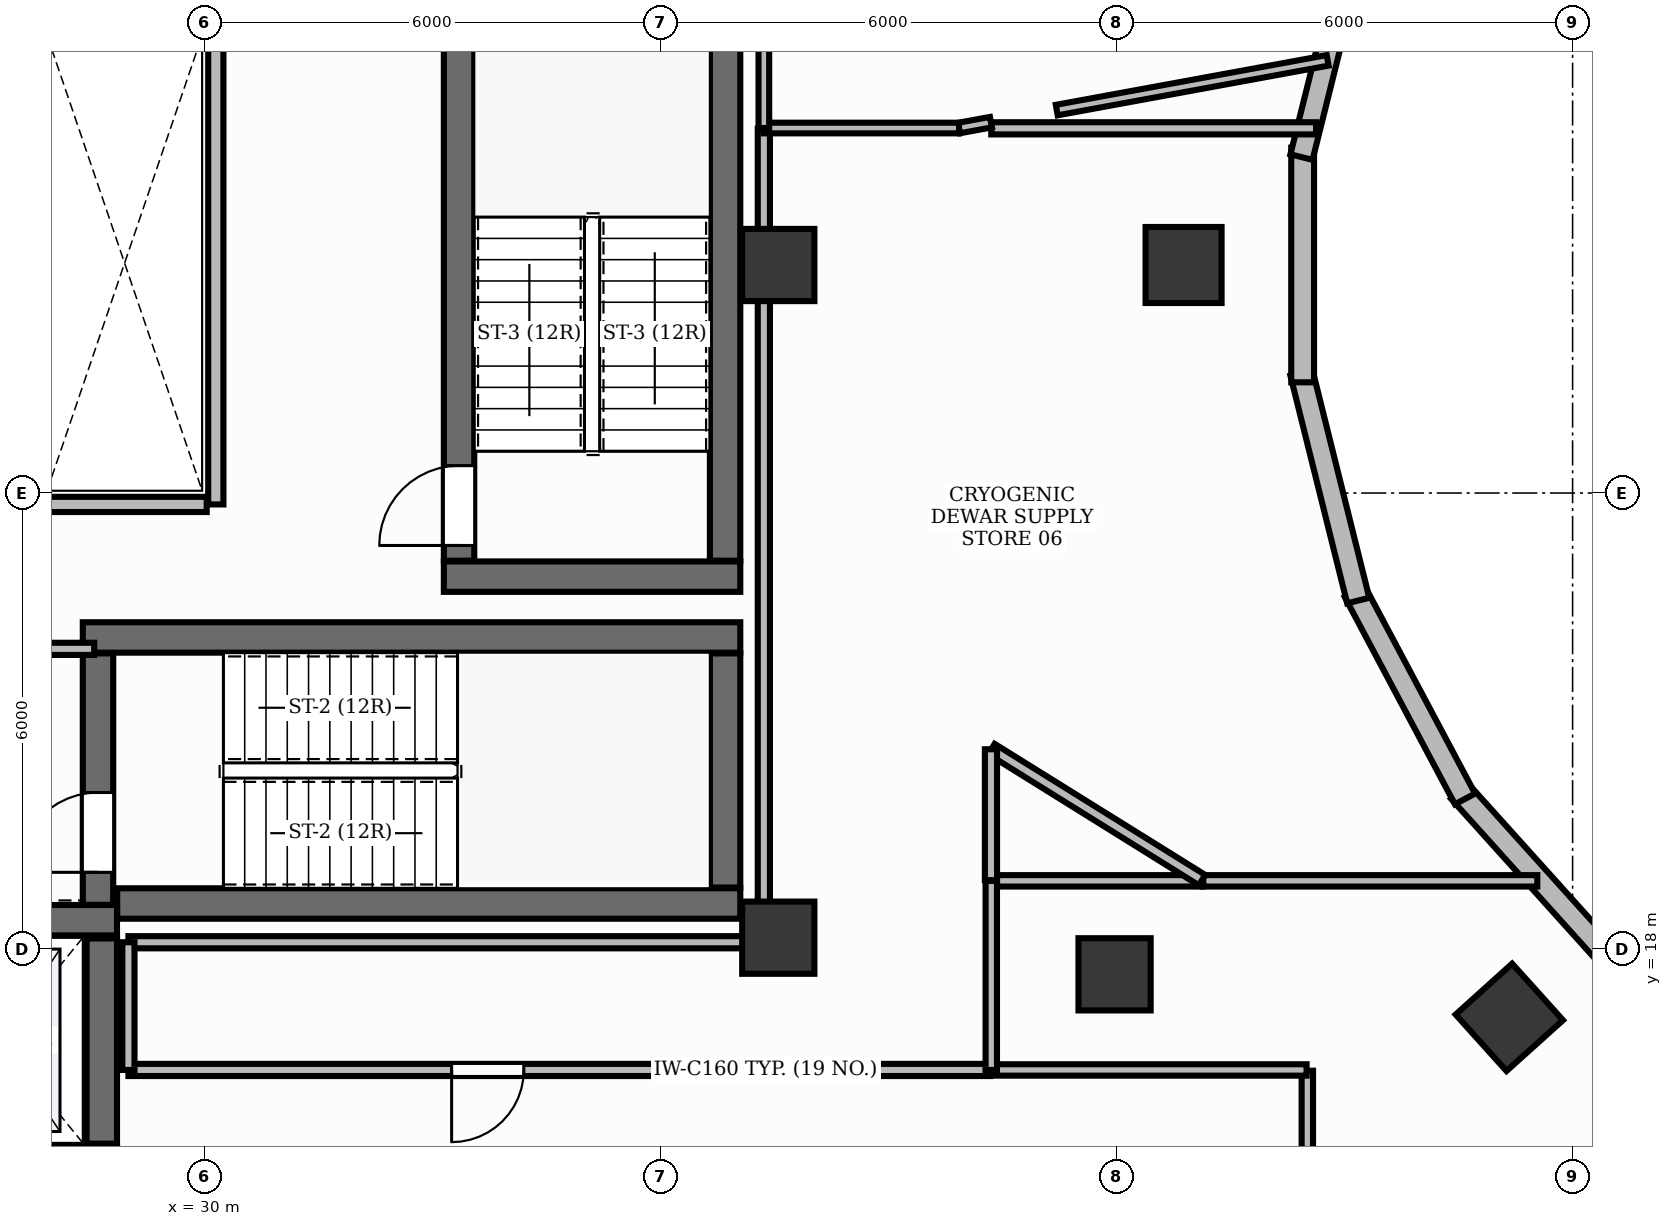
"""IFC4 building model, lengths in metres.
Left out: names, types, materials, properties, quantities, classifications, styles, units other than length and angle.
Written with IfcOpenShell. Run it as: python <this file> out.ifc"""

import sys

from ifc_helpers import new_model, si_unit, direction, frame, frame_2d, origin, origin_2d, place, context, subcontext, project, spatial, rectangle, extrude, element, fill, save


model = new_model("IFC4")
c1 = context("Model", 3, precision=1e-05, world=origin(), true_north=direction((0.0, 1.0)))
c2 = subcontext(c1, "Body", "Model", "MODEL_VIEW")
j1 = project(units=[si_unit("LENGTHUNIT", "METRE"), si_unit("PLANEANGLEUNIT", "RADIAN")], contexts=[c1])
p1 = place(None, origin())
s1 = spatial("IfcSite", under=j1, at=p1, CompositionType="ELEMENT")
p2 = place(p1, origin())
s2 = spatial("IfcBuilding", under=s1, at=p2, CompositionType="ELEMENT")
p3 = place(p2, frame((0.0, 0.0, 192.0)))
s3 = spatial("IfcBuildingStorey", under=s2, at=p3, CompositionType="ELEMENT", Elevation=192.0)
p4 = place(p3, frame((28.852, 18.6, 0.0), z_axis=(0.0, 0.0, 1.0), x_axis=(1.0, 0.0, 0.0)))
e1 = element("IfcWall", 1, at=p4, inside=s3, PredefinedType="SHEAR", context=c2, shape_type="SweptSolid", body=[
    extrude(rectangle(XDim=8.198, YDim=0.4, at=frame_2d((4.099, 0.0))), origin(), (0.0, 0.0, 1.0), 3.9),
])
p5 = place(p3, frame((28.4, 22.1, 0.0), z_axis=(0.0, 0.0, 1.0), x_axis=(1.0, 0.0, 0.0)))
e2 = element("IfcWall", 2, at=p5, inside=s3, PredefinedType="SHEAR", context=c2, shape_type="SweptSolid", body=[
    extrude(rectangle(XDim=8.65, YDim=0.4, at=frame_2d((4.325, 0.0))), origin(), (0.0, 0.0, 1.0), 3.9),
])
p6 = place(p3, frame((36.85, 18.81, 0.0), z_axis=(0.0, 0.0, 1.0), x_axis=(0.0, 1.0, 0.0)))
e3 = element("IfcWall", 3, at=p6, inside=s3, PredefinedType="SHEAR", context=c2, shape_type="SweptSolid", body=[
    extrude(rectangle(XDim=3.08, YDim=0.4, at=frame_2d((1.54, 0.0))), origin(), (0.0, 0.0, 1.0), 3.9),
])
p7 = place(p3, frame((28.6, 18.582, 0.0), z_axis=(0.0, 0.0, 1.0), x_axis=(0.0, 1.0, 0.0)))
e4 = element("IfcWall", 4, at=p7, inside=s3, PredefinedType="SHEAR", context=c2, shape_type="SweptSolid", body=[
    extrude(rectangle(XDim=3.308, YDim=0.4, at=frame_2d((1.654, 0.0))), origin(), (0.0, 0.0, 1.0), 3.9),
])
p8 = place(p7, frame((0.428, 0.0, 0.0)))
e5 = element("IfcOpeningElement", 5, at=p8, cuts=e4, PredefinedType="OPENING", context=c2, shape_type="SweptSolid", body=[
    extrude(rectangle(XDim=1.05, YDim=2.15, at=frame_2d((0.525, 1.075))), frame((0.0, 0.215, 0.0), z_axis=(0.0, -1.0, 0.0), x_axis=(1.0, 0.0, 0.0)), (0.0, 0.0, 1.0), 0.43),
])
p9 = place(p3, frame((33.15, 22.9, 0.0), z_axis=(0.0, 0.0, 1.0), x_axis=(1.0, 0.0, 0.0)))
e6 = element("IfcWall", 6, at=p9, inside=s3, PredefinedType="SHEAR", context=c2, shape_type="SweptSolid", body=[
    extrude(rectangle(XDim=3.9, YDim=0.4, at=frame_2d((1.95, 0.0))), origin(), (0.0, 0.0, 1.0), 3.9),
])
p10 = place(p3, frame((36.85, 23.11, 0.0), z_axis=(0.0, 0.0, 1.0), x_axis=(0.0, 1.0, 0.0)))
e7 = element("IfcWall", 7, at=p10, inside=s3, PredefinedType="SHEAR", context=c2, shape_type="SweptSolid", body=[
    extrude(rectangle(XDim=7.78, YDim=0.4, at=frame_2d((3.89, 0.0))), origin(), (0.0, 0.0, 1.0), 3.9),
])
p11 = place(p3, frame((33.35, 23.11, 0.0), z_axis=(0.0, 0.0, 1.0), x_axis=(0.0, 1.0, 0.0)))
e8 = element("IfcWall", 8, at=p11, inside=s3, PredefinedType="SHEAR", context=c2, shape_type="SweptSolid", body=[
    extrude(rectangle(XDim=7.78, YDim=0.4, at=frame_2d((3.89, 0.0))), origin(), (0.0, 0.0, 1.0), 3.9),
])
p12 = place(p11, frame((0.2, 0.0, 0.0)))
e9 = element("IfcOpeningElement", 9, at=p12, cuts=e8, PredefinedType="OPENING", context=c2, shape_type="SweptSolid", body=[
    extrude(rectangle(XDim=1.05, YDim=2.15, at=frame_2d((0.525, 1.075))), frame((0.0, 0.215, 0.0), z_axis=(0.0, -1.0, 0.0), x_axis=(1.0, 0.0, 0.0)), (0.0, 0.0, 1.0), 0.43),
])
p13 = place(p3, frame((25.75, 18.38, 0.0), z_axis=(0.0, 0.0, 1.0), x_axis=(1.0, 0.0, 0.0)))
e10 = element("IfcWall", 10, at=p13, inside=s3, PredefinedType="SHEAR", context=c2, shape_type="SweptSolid", body=[
    extrude(rectangle(XDim=3.1, YDim=0.4, at=frame_2d((1.55, 0.0))), origin(), (0.0, 0.0, 1.0), 3.9),
])
p14 = place(p13, frame((0.9, 0.0, 0.0)))
e11 = element("IfcOpeningElement", 11, at=p14, cuts=e10, PredefinedType="OPENING", context=c2, shape_type="SweptSolid", body=[
    extrude(rectangle(XDim=1.3, YDim=2.2, at=frame_2d((0.65, 1.1))), frame((0.0, 0.215, 0.0), z_axis=(0.0, -1.0, 0.0), x_axis=(1.0, 0.0, 0.0)), (0.0, 0.0, 1.0), 0.43),
])
p15 = place(p3, frame((28.65, 15.44, 0.0), z_axis=(0.0, 0.0, 1.0), x_axis=(0.0, 1.0, 0.0)))
e12 = element("IfcWall", 12, at=p15, inside=s3, PredefinedType="SHEAR", context=c2, shape_type="SweptSolid", body=[
    extrude(rectangle(XDim=2.7, YDim=0.4, at=frame_2d((1.35, 0.0))), origin(), (0.0, 0.0, 1.0), 3.9),
])
for number, where, z_axis, x_axis in (
    (13, (37.55, 18.15, -0.0), (0.0, 0.0, 1.0), (1.0, 0.0, 0.0)),
    (14, (37.55, 27.0, -0.0), (0.0, 0.0, 1.0), (1.0, 0.0, 0.0)),
):
    element("IfcColumn", number, at=place(p3, frame(where, z_axis=z_axis, x_axis=x_axis)), inside=s3, PredefinedType="PILASTER", context=c2, shape_type="SweptSolid", body=[
        extrude(rectangle(XDim=0.95, YDim=0.95, at=origin_2d()), origin(), (0.0, 0.0, 1.0), 3.901),
    ])
p16 = place(p3, frame((47.167, 17.102, -0.0), z_axis=(0.0, 0.0, 1.0), x_axis=(-0.669130606359, 0.743144825477, 0.0)))
e15 = element("IfcColumn", 15, at=p16, inside=s3, PredefinedType="COLUMN", context=c2, shape_type="SweptSolid", body=[
    extrude(rectangle(XDim=1.0, YDim=1.0, at=origin_2d()), origin(), (0.0, 0.0, 1.0), 3.901),
])
p17 = place(p3, frame((41.974, 17.668, -0.0), z_axis=(0.0, 0.0, 1.0), x_axis=(1.0, 0.0, 0.0)))
e16 = element("IfcColumn", 16, at=p17, inside=s3, PredefinedType="COLUMN", context=c2, shape_type="SweptSolid", body=[
    extrude(rectangle(XDim=0.95, YDim=0.95, at=origin_2d()), origin(), (0.0, 0.0, 1.0), 3.901),
])
p18 = place(p3, frame((42.882, 27.0, -0.0), z_axis=(0.0, 0.0, 1.0), x_axis=(0.0, 1.0, 0.0)))
e17 = element("IfcColumn", 17, at=p18, inside=s3, PredefinedType="COLUMN", context=c2, shape_type="SweptSolid", body=[
    extrude(rectangle(XDim=1.0, YDim=1.0, at=origin_2d()), origin(), (0.0, 0.0, 1.0), 3.901),
])
for number, where, z_axis, x_axis in (
    (18, (48.579, 17.784, 0.0), (0.0, 0.0, 1.0), (-0.669, 0.743, 0.0)),
    (19, (46.584, 19.976, 0.0), (0.0, 0.0, 1.0), (-0.469, 0.883, 0.0)),
    (20, (45.18, 22.585, 0.0), (0.0, 0.0, 1.0), (-0.242, 0.97, 0.0)),
    (21, (44.448, 25.457, 0.0), (0.0, 0.0, 1.0), (0.0, 1.0, 0.0)),
    (22, (44.433, 28.42, 0.0), (0.0, 0.0, 1.0), (0.242, 0.97, 0.0)),
):
    element("IfcWall", number, at=place(p3, frame(where, z_axis=z_axis, x_axis=x_axis)), inside=s3, PredefinedType="STANDARD", context=c2, shape_type="SweptSolid", body=[
        extrude(rectangle(XDim=3.087, YDim=0.3, at=frame_2d((1.543, 0.0))), origin(), (0.0, 0.0, 1.0), 3.9),
    ])
p19 = place(p3, frame((30.15, 23.85, 0.0), z_axis=(0.0, 0.0, 1.0), x_axis=(0.0, 1.0, 0.0)))
e23 = element("IfcWall", 23, at=p19, inside=s3, PredefinedType="PARTITIONING", context=c2, shape_type="SweptSolid", body=[
    extrude(rectangle(XDim=6.35, YDim=0.2, at=frame_2d((3.175, 0.0))), origin(), (0.0, 0.0, 1.0), 2.91),
])
p20 = place(p3, frame((27.934, 23.85, 0.0), z_axis=(0.0, 0.0, 1.0), x_axis=(1.0, 0.0, 0.0)))
e24 = element("IfcWall", 24, at=p20, inside=s3, PredefinedType="PARTITIONING", context=c2, shape_type="SweptSolid", body=[
    extrude(rectangle(XDim=2.096, YDim=0.2, at=frame_2d((1.048, 0.0))), origin(), (0.0, 0.0, 1.0), 2.91),
])
p21 = place(p3, frame((23.58, 21.95, 0.0), z_axis=(0.0, 0.0, 1.0), x_axis=(1.0, 0.0, 0.0)))
e25 = element("IfcWall", 25, at=p21, inside=s3, PredefinedType="PARTITIONING", context=c2, shape_type="SweptSolid", body=[
    extrude(rectangle(XDim=4.97, YDim=0.16, at=frame_2d((2.485, 0.0))), origin(), (0.0, 0.0, 1.0), 2.91),
])
p22 = place(p3, frame((40.342, 16.41, 0.0), z_axis=(0.0, 0.0, 1.0), x_axis=(-1.0, 0.0, 0.0)))
e26 = element("IfcWall", 26, at=p22, inside=s3, PredefinedType="PARTITIONING", context=c2, shape_type="SweptSolid", body=[
    extrude(rectangle(XDim=11.342, YDim=0.16, at=frame_2d((5.671, 0.0))), origin(), (0.0, 0.0, 1.0), 2.91),
])
p23 = place(p22, frame((6.14, 0.0, 0.0)))
e27 = element("IfcOpeningElement", 27, at=p23, cuts=e26, PredefinedType="OPENING", context=c2, shape_type="SweptSolid", body=[
    extrude(rectangle(XDim=0.95, YDim=2.15, at=frame_2d((0.475, 1.075))), frame((0.0, 0.095, 0.0), z_axis=(0.0, -1.0, 0.0), x_axis=(1.0, 0.0, 0.0)), (0.0, 0.0, 1.0), 0.19),
])
p24 = place(p3, frame((40.352, 18.898, 0.0), z_axis=(0.0, 0.0, 1.0), x_axis=(1.0, 0.0, 0.0)))
e28 = element("IfcWall", 28, at=p24, inside=s3, PredefinedType="PARTITIONING", context=c2, shape_type="SweptSolid", body=[
    extrude(rectangle(XDim=2.781, YDim=0.15, at=frame_2d((1.39, 0.0))), origin(), (0.0, 0.0, 1.0), 2.91),
])
p25 = place(p3, frame((43.141, 18.898, 0.0), z_axis=(0.0, 0.0, 1.0), x_axis=(1.0, 0.0, 0.0)))
e29 = element("IfcWall", 29, at=p25, inside=s3, PredefinedType="PARTITIONING", context=c2, shape_type="SweptSolid", body=[
    extrude(rectangle(XDim=4.395, YDim=0.15, at=frame_2d((2.198, 0.0))), origin(), (0.0, 0.0, 1.0), 2.91),
])
p26 = place(p3, frame((44.51, 12.6, 0.0), z_axis=(0.0, 0.0, 1.0), x_axis=(0.0, 1.0, 0.0)))
e30 = element("IfcWall", 30, at=p26, inside=s3, PredefinedType="PARTITIONING", context=c2, shape_type="SweptSolid", body=[
    extrude(rectangle(XDim=3.8, YDim=0.15, at=frame_2d((1.9, 0.0))), origin(), (0.0, 0.0, 1.0), 2.91),
])
p27 = place(p3, frame((44.5, 16.41, 0.0), z_axis=(0.0, 0.0, 1.0), x_axis=(-1.0, 0.0, 0.0)))
e31 = element("IfcWall", 31, at=p27, inside=s3, PredefinedType="PARTITIONING", context=c2, shape_type="SweptSolid", body=[
    extrude(rectangle(XDim=4.148, YDim=0.15, at=frame_2d((2.074, 0.0))), origin(), (0.0, 0.0, 1.0), 2.91),
])
p28 = place(p3, frame((40.352, 16.41, 0.0), z_axis=(0.0, 0.0, 1.0), x_axis=(0.0, 1.0, 0.0)))
e32 = element("IfcWall", 32, at=p28, inside=s3, PredefinedType="PARTITIONING", context=c2, shape_type="SweptSolid", body=[
    extrude(rectangle(XDim=2.488, YDim=0.15, at=frame_2d((1.244, 0.0))), origin(), (0.0, 0.0, 1.0), 2.91),
])
p29 = place(p3, frame((29.0, 18.09, 0.0), z_axis=(0.0, 0.0, 1.0), x_axis=(1.0, 0.0, 0.0)))
e33 = element("IfcWall", 33, at=p29, inside=s3, PredefinedType="PARTITIONING", context=c2, shape_type="SweptSolid", body=[
    extrude(rectangle(XDim=8.35, YDim=0.16, at=frame_2d((4.175, 0.0))), origin(), (0.0, 0.0, 1.0), 2.91),
])
p30 = place(p3, frame((37.36, 18.1, 0.0), z_axis=(0.0, 0.0, 1.0), x_axis=(0.0, 1.0, 0.0)))
e34 = element("IfcWall", 34, at=p30, inside=s3, PredefinedType="PARTITIONING", context=c2, shape_type="SweptSolid", body=[
    extrude(rectangle(XDim=10.694, YDim=0.16, at=frame_2d((5.347, 0.0))), origin(), (0.0, 0.0, 1.0), 2.91),
])
p31 = place(p3, frame((40.352, 28.798, 0.0), z_axis=(0.0, 0.0, 1.0), x_axis=(1.0, 0.0, 0.0)))
e35 = element("IfcWall", 35, at=p31, inside=s3, PredefinedType="PARTITIONING", context=c2, shape_type="SweptSolid", body=[
    extrude(rectangle(XDim=4.273, YDim=0.16, at=frame_2d((2.137, 0.0))), origin(), (0.0, 0.0, 1.0), 2.91),
])
p32 = place(p3, frame((43.125, 18.908, 0.0), z_axis=(0.0, 0.0, 1.0), x_axis=(-0.848988734201, 0.528410947274, 0.0)))
e36 = element("IfcWall", 36, at=p32, inside=s3, PredefinedType="PARTITIONING", context=c2, shape_type="SweptSolid", body=[
    extrude(rectangle(XDim=3.263, YDim=0.16, at=frame_2d((1.632, 0.0))), origin(), (0.0, 0.0, 1.0), 2.91),
])
p33 = place(p3, frame((40.348, 20.629, 0.0), z_axis=(0.0, 0.0, 1.0), x_axis=(0.0, -1.0, 0.0)))
e37 = element("IfcWall", 37, at=p33, inside=s3, PredefinedType="PARTITIONING", context=c2, shape_type="SweptSolid", body=[
    extrude(rectangle(XDim=1.722, YDim=0.16, at=frame_2d((0.861, 0.0))), origin(), (0.0, 0.0, 1.0), 2.91),
])
p34 = place(p3, frame((29.0, 16.41, 0.0), z_axis=(0.0, 0.0, 1.0), x_axis=(0.0, 1.0, 0.0)))
e38 = element("IfcWall", 38, at=p34, inside=s3, PredefinedType="PARTITIONING", context=c2, shape_type="SweptSolid", body=[
    extrude(rectangle(XDim=1.68, YDim=0.16, at=frame_2d((0.84, 0.0))), origin(), (0.0, 0.0, 1.0), 2.91),
])
p35 = place(p3, frame((44.778, 29.692, 0.0), z_axis=(0.0, 0.0, 1.0), x_axis=(-0.983576469436, -0.180491907776, 0.0)))
e39 = element("IfcWall", 39, at=p35, inside=s3, PredefinedType="PARTITIONING", context=c2, shape_type="SweptSolid", body=[
    extrude(rectangle(XDim=3.624, YDim=0.14, at=frame_2d((1.812, 0.0))), origin(), (0.0, 0.0, 1.0), 2.91),
])
p36 = place(p3, frame((40.348, 28.879, 0.0), z_axis=(0.0, 0.0, 1.0), x_axis=(-0.983557526281, -0.180595106511, 0.0)))
e40 = element("IfcWall", 40, at=p36, inside=s3, PredefinedType="PARTITIONING", context=c2, shape_type="SweptSolid", body=[
    extrude(rectangle(XDim=0.427, YDim=0.14, at=frame_2d((0.214, 0.0))), origin(), (0.0, 0.0, 1.0), 2.91),
])
p37 = place(p3, frame((39.927, 28.802, 0.0), z_axis=(0.0, 0.0, 1.0), x_axis=(-1.0, 0.0, 0.0)))
e41 = element("IfcWall", 41, at=p37, inside=s3, PredefinedType="PARTITIONING", context=c2, shape_type="SweptSolid", body=[
    extrude(rectangle(XDim=2.567, YDim=0.14, at=frame_2d((1.284, 0.0))), origin(), (0.0, 0.0, 1.0), 2.91),
])
p38 = place(p3, frame((37.36, 28.802, 0.0), z_axis=(0.0, 0.0, 1.0), x_axis=(0.0, 1.0, 0.0)))
e42 = element("IfcWall", 42, at=p38, inside=s3, PredefinedType="PARTITIONING", context=c2, shape_type="SweptSolid", body=[
    extrude(rectangle(XDim=7.098, YDim=0.14, at=frame_2d((3.549, 0.0))), origin(), (0.0, 0.0, 1.0), 2.91),
])
p39 = place(p8, origin())
e43 = element("IfcDoor", 43, at=p39, inside=s3, OperationType="SINGLE_SWING_LEFT", PredefinedType="DOOR", context=c2, shape_type="SweptSolid", body=[
    extrude(rectangle(XDim=1.05, YDim=2.15, at=frame_2d((0.525, 1.075))), frame((0.0, 0.025, 0.0), z_axis=(0.0, -1.0, 0.0), x_axis=(1.0, 0.0, 0.0)), (0.0, 0.0, 1.0), 0.05),
])
fill(e5, e43)
p40 = place(p12, origin())
e44 = element("IfcDoor", 44, at=p40, inside=s3, OperationType="SINGLE_SWING_LEFT", PredefinedType="DOOR", context=c2, shape_type="SweptSolid", body=[
    extrude(rectangle(XDim=1.05, YDim=2.15, at=frame_2d((0.525, 1.075))), frame((0.0, 0.025, 0.0), z_axis=(0.0, -1.0, 0.0), x_axis=(1.0, 0.0, 0.0)), (0.0, 0.0, 1.0), 0.05),
])
fill(e9, e44)
p41 = place(p23, origin())
e45 = element("IfcDoor", 45, at=p41, inside=s3, OperationType="SINGLE_SWING_RIGHT", PredefinedType="DOOR", context=c2, shape_type="SweptSolid", body=[
    extrude(rectangle(XDim=0.95, YDim=2.15, at=frame_2d((0.475, 1.075))), frame((0.0, 0.025, 0.0), z_axis=(0.0, -1.0, 0.0), x_axis=(1.0, 0.0, 0.0)), (0.0, 0.0, 1.0), 0.05),
])
fill(e27, e45)
save(model, sys.argv[1])
